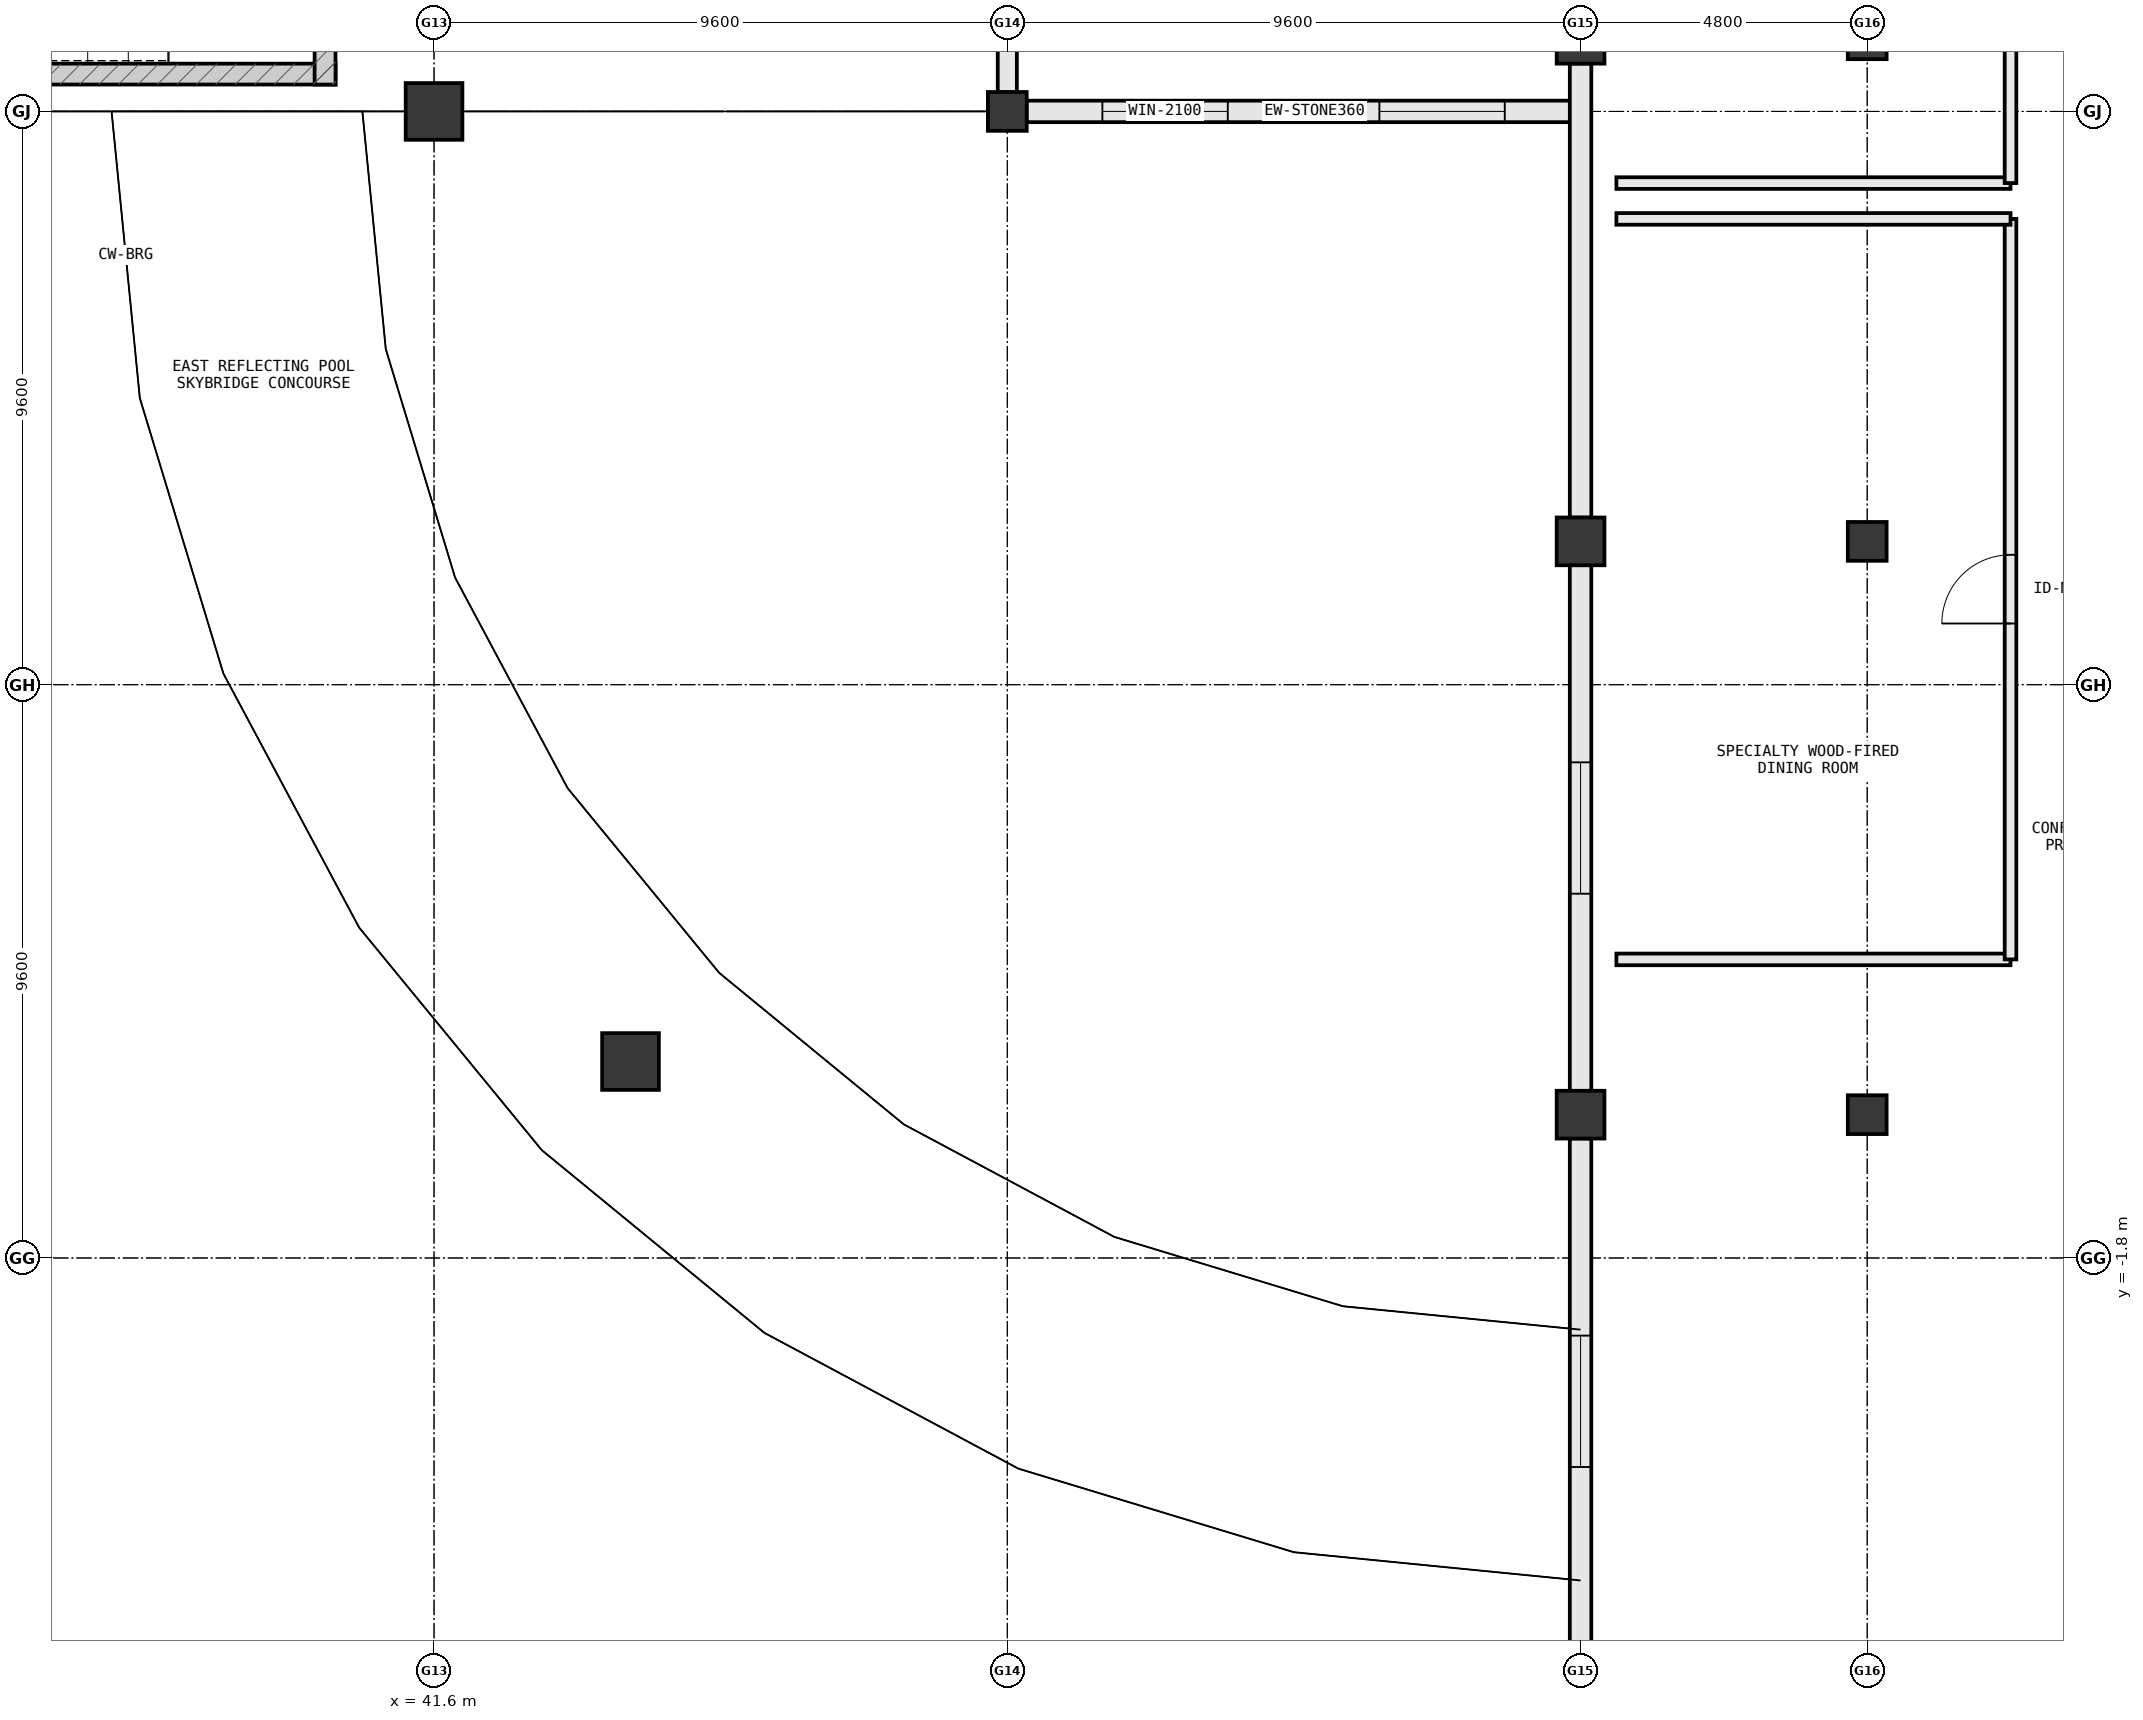
"""IFC4 building model, lengths in metres.
Left out: names, types, materials, properties, quantities, classifications, styles, units other than length and angle.
Written with IfcOpenShell. Run it as: python <this file> out.ifc"""

import sys

from ifc_helpers import new_model, si_unit, direction, frame, frame_2d, origin, origin_2d, place, context, subcontext, project, spatial, rectangle, circle, extrude, element, fill, save


model = new_model("IFC4")
c1 = context("Model", 3, precision=1e-05, world=origin(), true_north=direction((0.0, 1.0)))
c2 = subcontext(c1, "Body", "Model", "MODEL_VIEW")
j1 = project(units=[si_unit("LENGTHUNIT", "METRE"), si_unit("PLANEANGLEUNIT", "RADIAN")], contexts=[c1])
p1 = place(None, origin())
s1 = spatial("IfcSite", under=j1, at=p1, CompositionType="ELEMENT")
p2 = place(p1, origin())
s2 = spatial("IfcBuilding", under=s1, at=p2, CompositionType="ELEMENT")
p3 = place(p2, frame((0.0, 0.0, 5.4)))
s3 = spatial("IfcBuildingStorey", under=s2, at=p3, CompositionType="ELEMENT", Elevation=5.4)
p4 = place(p3, frame((41.6, 17.4, 0.0), z_axis=(0.0, 0.0, 1.0), x_axis=(1.0, 0.0, 0.0)))
e1 = element("IfcColumn", 1, at=p4, inside=s3, PredefinedType="COLUMN", context=c2, shape_type="SweptSolid", body=[
    extrude(circle(Radius=0.475, at=origin_2d()), origin(), (0.0, 0.0, 1.0), 5.4),
])
for number, where, z_axis, x_axis in (
    (2, (60.8, 0.6, 0.0), (0.0, 0.0, 1.0), (1.0, 0.0, 0.0)),
    (3, (60.8, 10.2, 0.0), (0.0, 0.0, 1.0), (1.0, 0.0, 0.0)),
    (4, (60.8, 18.6, 0.0), (0.0, 0.0, 1.0), (1.0, 0.0, 0.0)),
):
    element("IfcColumn", number, at=place(p3, frame(where, z_axis=z_axis, x_axis=x_axis)), inside=s3, PredefinedType="COLUMN", context=c2, shape_type="SweptSolid", body=[
        extrude(rectangle(XDim=0.8, YDim=0.8, at=origin_2d()), origin(), (0.0, 0.0, 1.0), 5.4),
    ])
for number, where, z_axis, x_axis in (
    (5, (65.6, 0.6, 0.0), (0.0, 0.0, 1.0), (1.0, 0.0, 0.0)),
    (6, (65.6, 10.2, 0.0), (0.0, 0.0, 1.0), (1.0, 0.0, 0.0)),
    (7, (65.6, 18.6, 0.0), (0.0, 0.0, 1.0), (1.0, 0.0, 0.0)),
    (8, (51.2, 17.4, 0.0), (0.0, 0.0, 1.0), (1.0, 0.0, 0.0)),
):
    element("IfcColumn", number, at=place(p3, frame(where, z_axis=z_axis, x_axis=x_axis)), inside=s3, PredefinedType="COLUMN", context=c2, shape_type="SweptSolid", body=[
        extrude(rectangle(XDim=0.65, YDim=0.65, at=origin_2d()), origin(), (0.0, 0.0, 1.0), 5.4),
    ])
p5 = place(p3, frame((44.89, 1.49, 0.0), z_axis=(0.0, 0.0, 1.0), x_axis=(1.0, 0.0, 0.0)))
e9 = element("IfcColumn", 9, at=p5, inside=s3, PredefinedType="COLUMN", context=c2, shape_type="SweptSolid", body=[
    extrude(circle(Radius=0.475, at=origin_2d()), origin(), (0.0, 0.0, 1.0), 5.4),
])
p6 = place(p3, frame((51.2, 17.723, 0.0), z_axis=(0.0, 0.0, 1.0), x_axis=(0.0, 1.0, 0.0)))
e10 = element("IfcWall", 10, at=p6, inside=s3, PredefinedType="STANDARD", context=c2, shape_type="SweptSolid", body=[
    extrude(rectangle(XDim=8.854, YDim=0.32, at=frame_2d((4.427, 0.0))), origin(), (0.0, 0.0, 1.0), 4.485),
])
p7 = place(p6, frame((3.377, 0.0, 0.85)))
e11 = element("IfcOpeningElement", 11, at=p7, cuts=e10, PredefinedType="OPENING", context=c2, shape_type="SweptSolid", body=[
    extrude(rectangle(XDim=2.1, YDim=1.95, at=frame_2d((1.05, 0.975))), frame((0.0, 0.172, 0.0), z_axis=(0.0, -1.0, 0.0), x_axis=(1.0, 0.0, 0.0)), (0.0, 0.0, 1.0), 0.344),
])
p8 = place(p3, frame((51.523, 17.4, 0.0), z_axis=(0.0, 0.0, 1.0), x_axis=(1.0, 0.0, 0.0)))
e12 = element("IfcWall", 12, at=p8, inside=s3, PredefinedType="STANDARD", context=c2, shape_type="SweptSolid", body=[
    extrude(rectangle(XDim=9.277, YDim=0.36, at=frame_2d((4.639, 0.0))), origin(), (0.0, 0.0, 1.0), 5.13),
])
p9 = place(p8, frame((1.269, 0.0, 0.85)))
e13 = element("IfcOpeningElement", 13, at=p9, cuts=e12, PredefinedType="OPENING", context=c2, shape_type="SweptSolid", body=[
    extrude(rectangle(XDim=2.1, YDim=1.95, at=frame_2d((1.05, 0.975))), frame((0.0, 0.192, 0.0), z_axis=(0.0, -1.0, 0.0), x_axis=(1.0, 0.0, 0.0)), (0.0, 0.0, 1.0), 0.384),
])
p10 = place(p8, frame((5.908, 0.0, 0.85)))
e14 = element("IfcOpeningElement", 14, at=p10, cuts=e12, PredefinedType="OPENING", context=c2, shape_type="SweptSolid", body=[
    extrude(rectangle(XDim=2.1, YDim=1.95, at=frame_2d((1.05, 0.975))), frame((0.0, 0.192, 0.0), z_axis=(0.0, -1.0, 0.0), x_axis=(1.0, 0.0, 0.0)), (0.0, 0.0, 1.0), 0.384),
])
p11 = place(p3, frame((60.8, 18.202, 0.0), z_axis=(0.0, 0.0, 1.0), x_axis=(0.0, -1.0, 0.0)))
e15 = element("IfcWall", 15, at=p11, inside=s3, PredefinedType="STANDARD", context=c2, shape_type="SweptSolid", body=[
    extrude(rectangle(XDim=7.604, YDim=0.36, at=frame_2d((3.802, 0.0))), origin(), (0.0, 0.0, 1.0), 4.585),
])
p12 = place(p3, frame((60.8, 9.802, 0.0), z_axis=(0.0, 0.0, 1.0), x_axis=(0.0, -1.0, 0.0)))
e16 = element("IfcWall", 16, at=p12, inside=s3, PredefinedType="STANDARD", context=c2, shape_type="SweptSolid", body=[
    extrude(rectangle(XDim=8.804, YDim=0.36, at=frame_2d((4.402, 0.0))), origin(), (0.0, 0.0, 1.0), 4.485),
])
p13 = place(p12, frame((3.302, 0.0, 0.85)))
e17 = element("IfcOpeningElement", 17, at=p13, cuts=e16, PredefinedType="OPENING", context=c2, shape_type="SweptSolid", body=[
    extrude(rectangle(XDim=2.2, YDim=2.0, at=frame_2d((1.1, 1.0))), frame((0.0, 0.192, 0.0), z_axis=(0.0, -1.0, 0.0), x_axis=(1.0, 0.0, 0.0)), (0.0, 0.0, 1.0), 0.384),
])
p14 = place(p3, frame((60.8, 0.202, 0.0), z_axis=(0.0, 0.0, 1.0), x_axis=(0.0, -1.0, 0.0)))
e18 = element("IfcWall", 18, at=p14, inside=s3, PredefinedType="STANDARD", context=c2, shape_type="SweptSolid", body=[
    extrude(rectangle(XDim=8.804, YDim=0.36, at=frame_2d((4.402, 0.0))), origin(), (0.0, 0.0, 1.0), 4.485),
])
p15 = place(p14, frame((3.302, 0.0, 0.85)))
e19 = element("IfcOpeningElement", 19, at=p15, cuts=e18, PredefinedType="OPENING", context=c2, shape_type="SweptSolid", body=[
    extrude(rectangle(XDim=2.2, YDim=2.0, at=frame_2d((1.1, 1.0))), frame((0.0, 0.192, 0.0), z_axis=(0.0, -1.0, 0.0), x_axis=(1.0, 0.0, 0.0)), (0.0, 0.0, 1.0), 0.384),
])
p16 = place(p3, frame((27.85, 18.025, 0.0), z_axis=(0.0, 0.0, 1.0), x_axis=(1.0, 0.0, 0.0)))
e20 = element("IfcWall", 20, at=p16, inside=s3, PredefinedType="SHEAR", context=c2, shape_type="SweptSolid", body=[
    extrude(rectangle(XDim=12.1, YDim=0.35, at=frame_2d((6.05, 0.0))), origin(), (0.0, 0.0, 1.0), 5.4),
])
p17 = place(p3, frame((39.775, 17.85, 0.0), z_axis=(0.0, 0.0, 1.0), x_axis=(0.0, 1.0, 0.0)))
e21 = element("IfcWall", 21, at=p17, inside=s3, PredefinedType="SHEAR", context=c2, shape_type="SweptSolid", body=[
    extrude(rectangle(XDim=5.3, YDim=0.35, at=frame_2d((2.65, 0.0))), origin(), (0.0, 0.0, 1.0), 5.4),
])
p18 = place(p3, frame((61.4, 3.2, 0.0), z_axis=(0.0, 0.0, 1.0), x_axis=(1.0, 0.0, 0.0)))
e22 = element("IfcWall", 22, at=p18, inside=s3, PredefinedType="PARTITIONING", context=c2, shape_type="SweptSolid", body=[
    extrude(rectangle(XDim=6.6, YDim=0.195, at=frame_2d((3.3, 0.0))), origin(), (0.0, 0.0, 1.0), 5.13),
])
p19 = place(p3, frame((68.0, 3.2, 0.0), z_axis=(0.0, 0.0, 1.0), x_axis=(0.0, 1.0, 0.0)))
e23 = element("IfcWall", 23, at=p19, inside=s3, PredefinedType="PARTITIONING", context=c2, shape_type="SweptSolid", body=[
    extrude(rectangle(XDim=12.4, YDim=0.195, at=frame_2d((6.2, 0.0))), origin(), (0.0, 0.0, 1.0), 5.13),
])
p20 = place(p19, frame((5.625, 0.0, 0.0)))
e24 = element("IfcOpeningElement", 24, at=p20, cuts=e23, PredefinedType="OPENING", context=c2, shape_type="SweptSolid", body=[
    extrude(rectangle(XDim=1.15, YDim=2.2, at=frame_2d((0.575, 1.1))), frame((0.0, 0.11, 0.0), z_axis=(0.0, -1.0, 0.0), x_axis=(1.0, 0.0, 0.0)), (0.0, 0.0, 1.0), 0.219),
])
for number, where, z_axis, x_axis in (
    (25, (68.0, 15.6, 0.0), (0.0, 0.0, 1.0), (-1.0, 0.0, 0.0)),
    (26, (61.4, 16.2, 0.0), (0.0, 0.0, 1.0), (1.0, 0.0, 0.0)),
):
    element("IfcWall", number, at=place(p3, frame(where, z_axis=z_axis, x_axis=x_axis)), inside=s3, PredefinedType="PARTITIONING", context=c2, shape_type="SweptSolid", body=[
        extrude(rectangle(XDim=6.6, YDim=0.195, at=frame_2d((3.3, 0.0))), origin(), (0.0, 0.0, 1.0), 5.13),
    ])
p21 = place(p3, frame((68.0, 16.2, 0.0), z_axis=(0.0, 0.0, 1.0), x_axis=(0.0, 1.0, 0.0)))
e27 = element("IfcWall", 27, at=p21, inside=s3, PredefinedType="PARTITIONING", context=c2, shape_type="SweptSolid", body=[
    extrude(rectangle(XDim=11.0, YDim=0.195, at=frame_2d((5.5, 0.0))), origin(), (0.0, 0.0, 1.0), 5.13),
])
p22 = place(p21, frame((4.925, 0.0, 0.0)))
e28 = element("IfcOpeningElement", 28, at=p22, cuts=e27, PredefinedType="OPENING", context=c2, shape_type="SweptSolid", body=[
    extrude(rectangle(XDim=1.15, YDim=2.2, at=frame_2d((0.575, 1.1))), frame((0.0, 0.11, 0.0), z_axis=(0.0, -1.0, 0.0), x_axis=(1.0, 0.0, 0.0)), (0.0, 0.0, 1.0), 0.219),
])
p23 = place(p9, origin())
e29 = element("IfcWindow", 29, at=p23, inside=s3, PartitioningType="DOUBLE_PANEL_VERTICAL", PredefinedType="WINDOW", context=c2, shape_type="SweptSolid", body=[
    extrude(rectangle(XDim=2.1, YDim=1.95, at=frame_2d((1.05, 0.975))), frame((0.0, 0.03, 0.0), z_axis=(0.0, -1.0, 0.0), x_axis=(1.0, 0.0, 0.0)), (0.0, 0.0, 1.0), 0.06),
])
fill(e13, e29)
p24 = place(p10, origin())
e30 = element("IfcWindow", 30, at=p24, inside=s3, PartitioningType="DOUBLE_PANEL_VERTICAL", PredefinedType="WINDOW", context=c2, shape_type="SweptSolid", body=[
    extrude(rectangle(XDim=2.1, YDim=1.95, at=frame_2d((1.05, 0.975))), frame((0.0, 0.03, 0.0), z_axis=(0.0, -1.0, 0.0), x_axis=(1.0, 0.0, 0.0)), (0.0, 0.0, 1.0), 0.06),
])
fill(e14, e30)
p25 = place(p13, origin())
e31 = element("IfcWindow", 31, at=p25, inside=s3, PartitioningType="DOUBLE_PANEL_VERTICAL", PredefinedType="WINDOW", context=c2, shape_type="SweptSolid", body=[
    extrude(rectangle(XDim=2.2, YDim=2.0, at=frame_2d((1.1, 1.0))), frame((0.0, 0.03, 0.0), z_axis=(0.0, -1.0, 0.0), x_axis=(1.0, 0.0, 0.0)), (0.0, 0.0, 1.0), 0.06),
])
fill(e17, e31)
p26 = place(p15, origin())
e32 = element("IfcWindow", 32, at=p26, inside=s3, PartitioningType="DOUBLE_PANEL_VERTICAL", PredefinedType="WINDOW", context=c2, shape_type="SweptSolid", body=[
    extrude(rectangle(XDim=2.2, YDim=2.0, at=frame_2d((1.1, 1.0))), frame((0.0, 0.03, 0.0), z_axis=(0.0, -1.0, 0.0), x_axis=(1.0, 0.0, 0.0)), (0.0, 0.0, 1.0), 0.06),
])
fill(e19, e32)
p27 = place(p20, origin())
e33 = element("IfcDoor", 33, at=p27, inside=s3, OperationType="SINGLE_SWING_LEFT", PredefinedType="DOOR", context=c2, shape_type="SweptSolid", body=[
    extrude(rectangle(XDim=1.15, YDim=2.2, at=frame_2d((0.575, 1.1))), frame((0.0, 0.025, 0.0), z_axis=(0.0, -1.0, 0.0), x_axis=(1.0, 0.0, 0.0)), (0.0, 0.0, 1.0), 0.05),
])
fill(e24, e33)
save(model, sys.argv[1])
